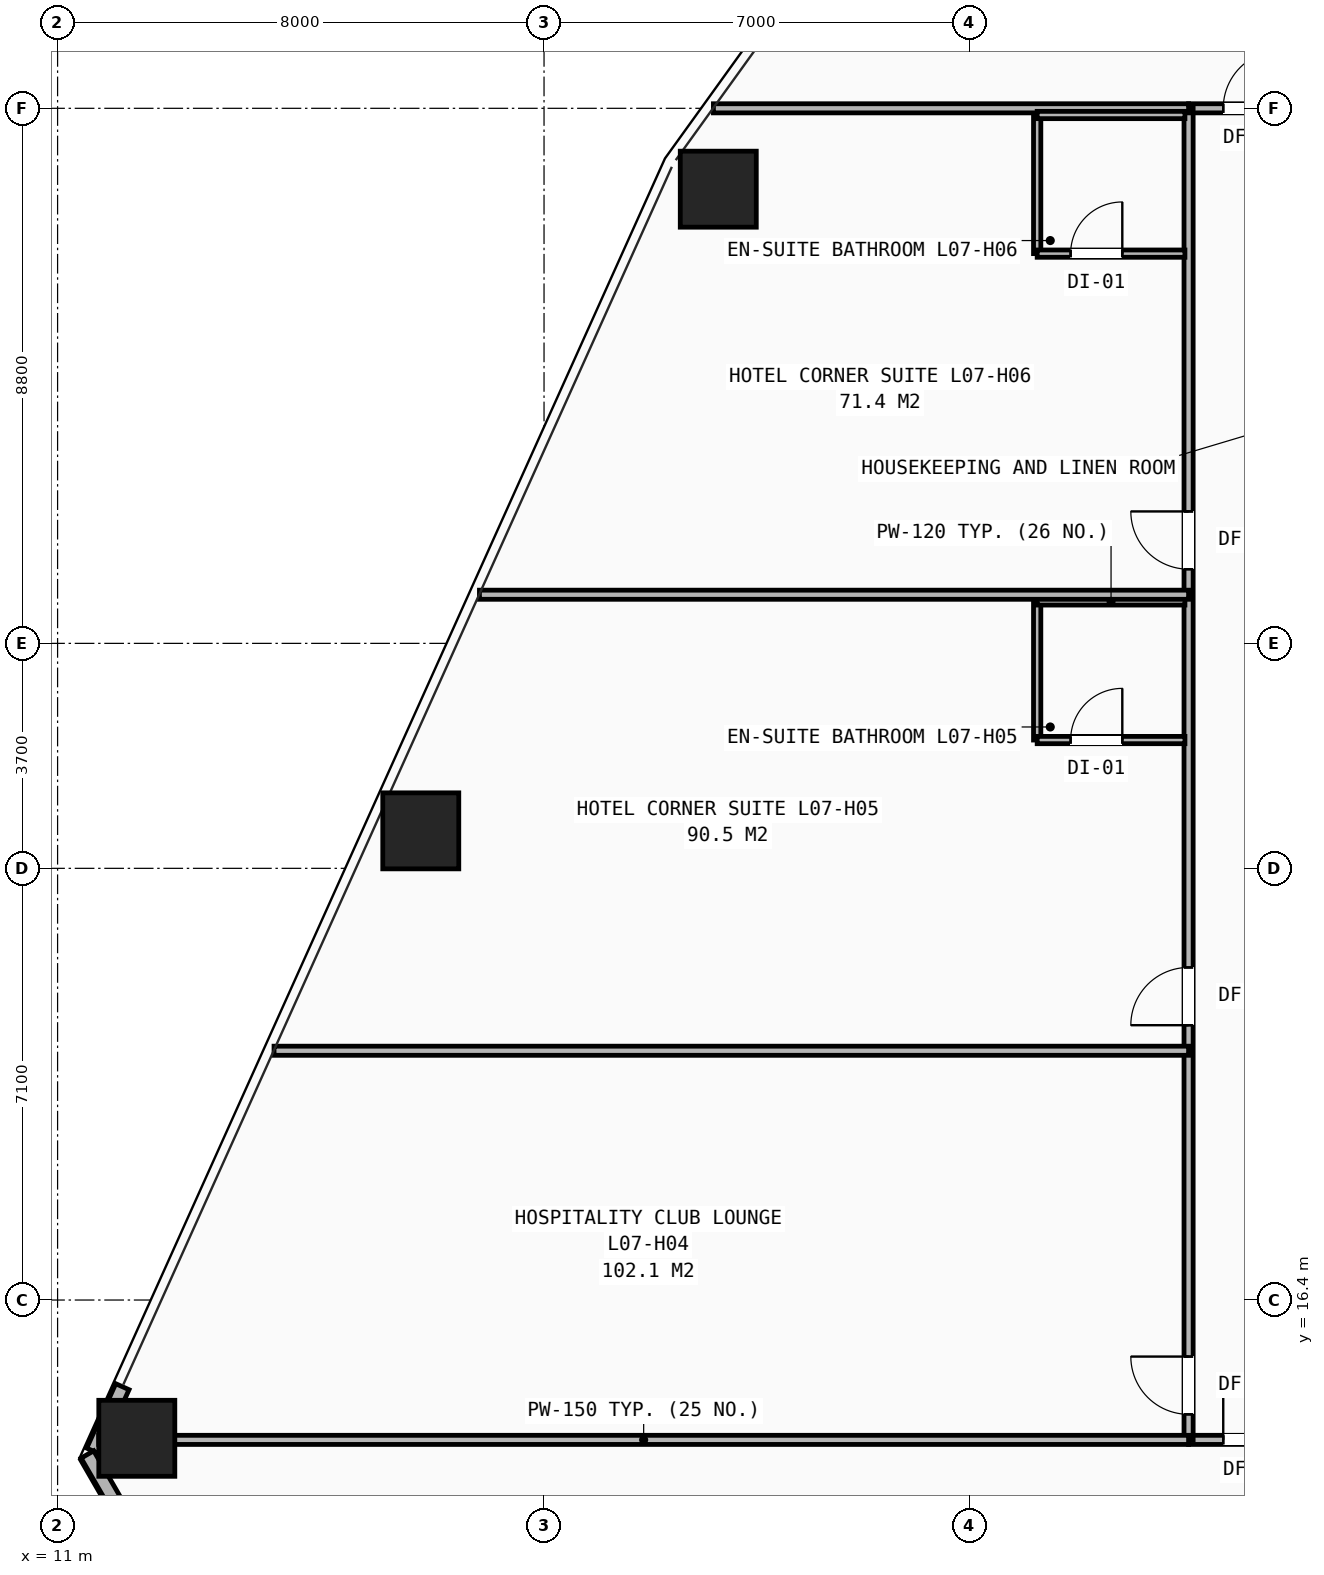
"""IFC4 building model, lengths in metres.
Left out: names, types, materials, properties, quantities, classifications, styles, units other than length and angle.
Written with IfcOpenShell. Run it as: python <this file> out.ifc"""

import sys

from ifc_helpers import new_model, si_unit, direction, frame, frame_2d, origin, origin_2d, place, context, subcontext, project, spatial, rectangle, hollow_rectangle, extrude, element, fill, save


model = new_model("IFC4")
c1 = context("Model", 3, precision=1e-05, world=origin(), true_north=direction((0.0, 1.0)))
c2 = subcontext(c1, "Body", "Model", "MODEL_VIEW")
j1 = project(units=[si_unit("LENGTHUNIT", "METRE"), si_unit("PLANEANGLEUNIT", "RADIAN")], contexts=[c1])
p1 = place(None, origin())
s1 = spatial("IfcSite", under=j1, at=p1, CompositionType="ELEMENT")
p2 = place(p1, origin())
s2 = spatial("IfcBuilding", under=s1, at=p2, CompositionType="ELEMENT")
p3 = place(p2, frame((0.0, 0.0, 30.4)))
s3 = spatial("IfcBuildingStorey", under=s2, at=p3, CompositionType="ELEMENT", Elevation=30.4)
for number, where, z_axis, x_axis in (
    (1, (21.865, 34.67, 0.0), (0.0, 0.0, 1.0), (1.0, 0.0, 0.0)),
    (2, (16.973, 24.116, 0.0), (0.0, 0.0, 1.0), (1.0, 0.0, 0.0)),
    (3, (12.303, 14.126, 0.0), (0.0, 0.0, 1.0), (1.0, 0.0, 0.0)),
):
    element("IfcColumn", number, at=place(p3, frame(where, z_axis=z_axis, x_axis=x_axis)), inside=s3, PredefinedType="COLUMN", context=c2, shape_type="SweptSolid", body=[
        extrude(hollow_rectangle(XDim=1.25, YDim=1.25, WallThickness=0.08, at=origin_2d()), origin(), (0.0, 0.0, 1.0), 3.2),
    ])
p4 = place(p3, frame((12.065, 14.975, 0.0), z_axis=(0.0, 0.0, 1.0), x_axis=(-0.410810004845, -0.91172097701, 0.0)))
e4 = element("IfcWall", 4, at=p4, inside=s3, PredefinedType="SHEAR", context=c2, shape_type="SweptSolid", body=[
    extrude(rectangle(XDim=1.162, YDim=0.24, at=frame_2d((0.581, 0.0))), origin(), (0.0, 0.0, 1.0), 2.263),
])
p5 = place(p3, frame((16.79, 4.68, 0.0), z_axis=(0.0, 0.0, 1.0), x_axis=(-0.49998363312, 0.866034853001, 0.0)))
e5 = element("IfcWall", 5, at=p5, inside=s3, PredefinedType="SHEAR", context=c2, shape_type="SweptSolid", body=[
    extrude(rectangle(XDim=10.6, YDim=0.24, at=frame_2d((5.3, 0.0))), origin(), (0.0, 0.0, 1.0), 2.263),
])
p6 = place(p3, frame((29.6, 14.1, 0.0), z_axis=(0.0, 0.0, 1.0), x_axis=(1.0, 0.0, 0.0)))
e6 = element("IfcWall", 6, at=p6, inside=s3, PredefinedType="PARTITIONING", context=c2, shape_type="SweptSolid", body=[
    extrude(rectangle(XDim=20.8, YDim=0.15, at=frame_2d((10.4, 0.0))), origin(), (0.0, 0.0, 1.0), 2.431),
])
p7 = place(p6, frame((0.57, 0.0, 0.0)))
e7 = element("IfcOpeningElement", 7, at=p7, cuts=e6, PredefinedType="OPENING", context=c2, shape_type="SweptSolid", body=[
    extrude(rectangle(XDim=0.95, YDim=2.1, at=frame_2d((0.475, 1.05))), frame((0.0, 0.085, 0.0), z_axis=(0.0, -1.0, 0.0), x_axis=(1.0, 0.0, 0.0)), (0.0, 0.0, 1.0), 0.17),
])
p8 = place(p6, frame((5.32, 0.0, 0.0)))
e8 = element("IfcOpeningElement", 8, at=p8, cuts=e6, PredefinedType="OPENING", context=c2, shape_type="SweptSolid", body=[
    extrude(rectangle(XDim=0.95, YDim=2.1, at=frame_2d((0.475, 1.05))), frame((0.0, 0.085, 0.0), z_axis=(0.0, -1.0, 0.0), x_axis=(1.0, 0.0, 0.0)), (0.0, 0.0, 1.0), 0.17),
])
p9 = place(p6, frame((13.32, 0.0, 0.0)))
e9 = element("IfcOpeningElement", 9, at=p9, cuts=e6, PredefinedType="OPENING", context=c2, shape_type="SweptSolid", body=[
    extrude(rectangle(XDim=0.95, YDim=2.1, at=frame_2d((0.475, 1.05))), frame((0.0, 0.085, 0.0), z_axis=(0.0, -1.0, 0.0), x_axis=(1.0, 0.0, 0.0)), (0.0, 0.0, 1.0), 0.17),
])
p10 = place(p3, frame((29.6, 36.0, 0.0), z_axis=(0.0, 0.0, 1.0), x_axis=(1.0, 0.0, 0.0)))
e10 = element("IfcWall", 10, at=p10, inside=s3, PredefinedType="PARTITIONING", context=c2, shape_type="SweptSolid", body=[
    extrude(rectangle(XDim=10.375, YDim=0.15, at=frame_2d((5.188, 0.0))), origin(), (0.0, 0.0, 1.0), 2.98),
])
p11 = place(p10, frame((0.57, 0.0, 0.0)))
e11 = element("IfcOpeningElement", 11, at=p11, cuts=e10, PredefinedType="OPENING", context=c2, shape_type="SweptSolid", body=[
    extrude(rectangle(XDim=0.95, YDim=2.1, at=frame_2d((0.475, 1.05))), frame((0.0, 0.085, 0.0), z_axis=(0.0, -1.0, 0.0), x_axis=(1.0, 0.0, 0.0)), (0.0, 0.0, 1.0), 0.17),
])
p12 = place(p10, frame((5.32, 0.0, 0.0)))
e12 = element("IfcOpeningElement", 12, at=p12, cuts=e10, PredefinedType="OPENING", context=c2, shape_type="SweptSolid", body=[
    extrude(rectangle(XDim=0.95, YDim=2.1, at=frame_2d((0.475, 1.05))), frame((0.0, 0.085, 0.0), z_axis=(0.0, -1.0, 0.0), x_axis=(1.0, 0.0, 0.0)), (0.0, 0.0, 1.0), 0.17),
])
p13 = place(p3, frame((29.6, 14.1, 0.0), z_axis=(0.0, 0.0, 1.0), x_axis=(0.0, 1.0, 0.0)))
e13 = element("IfcWall", 13, at=p13, inside=s3, PredefinedType="PARTITIONING", context=c2, shape_type="SweptSolid", body=[
    extrude(rectangle(XDim=21.9, YDim=0.15, at=frame_2d((10.95, 0.0))), origin(), (0.0, 0.0, 1.0), 2.431),
])
p14 = place(p13, frame((0.42, 0.0, 0.0)))
e14 = element("IfcOpeningElement", 14, at=p14, cuts=e13, PredefinedType="OPENING", context=c2, shape_type="SweptSolid", body=[
    extrude(rectangle(XDim=0.95, YDim=2.1, at=frame_2d((0.475, 1.05))), frame((0.0, 0.085, 0.0), z_axis=(0.0, -1.0, 0.0), x_axis=(1.0, 0.0, 0.0)), (0.0, 0.0, 1.0), 0.17),
])
p15 = place(p13, frame((6.82, 0.0, 0.0)))
e15 = element("IfcOpeningElement", 15, at=p15, cuts=e13, PredefinedType="OPENING", context=c2, shape_type="SweptSolid", body=[
    extrude(rectangle(XDim=0.95, YDim=2.1, at=frame_2d((0.475, 1.05))), frame((0.0, 0.085, 0.0), z_axis=(0.0, -1.0, 0.0), x_axis=(1.0, 0.0, 0.0)), (0.0, 0.0, 1.0), 0.17),
])
p16 = place(p13, frame((14.32, 0.0, 0.0)))
e16 = element("IfcOpeningElement", 16, at=p16, cuts=e13, PredefinedType="OPENING", context=c2, shape_type="SweptSolid", body=[
    extrude(rectangle(XDim=0.95, YDim=2.1, at=frame_2d((0.475, 1.05))), frame((0.0, 0.085, 0.0), z_axis=(0.0, -1.0, 0.0), x_axis=(1.0, 0.0, 0.0)), (0.0, 0.0, 1.0), 0.17),
])
p17 = place(p3, frame((11.677, 14.1, 0.0), z_axis=(0.0, 0.0, 1.0), x_axis=(1.0, 0.0, 0.0)))
e17 = element("IfcWall", 17, at=p17, inside=s3, PredefinedType="PARTITIONING", context=c2, shape_type="SweptSolid", body=[
    extrude(rectangle(XDim=17.923, YDim=0.15, at=frame_2d((8.961, 0.0))), origin(), (0.0, 0.0, 1.0), 2.268),
])
p18 = place(p3, frame((21.786, 36.0, 0.0), z_axis=(0.0, 0.0, 1.0), x_axis=(1.0, 0.0, 0.0)))
e18 = element("IfcWall", 18, at=p18, inside=s3, PredefinedType="PARTITIONING", context=c2, shape_type="SweptSolid", body=[
    extrude(rectangle(XDim=7.814, YDim=0.15, at=frame_2d((3.907, 0.0))), origin(), (0.0, 0.0, 1.0), 2.268),
])
p19 = place(p3, frame((14.56, 20.5, 0.0), z_axis=(0.0, 0.0, 1.0), x_axis=(1.0, 0.0, 0.0)))
e19 = element("IfcWall", 19, at=p19, inside=s3, PredefinedType="PARTITIONING", context=c2, shape_type="SweptSolid", body=[
    extrude(rectangle(XDim=15.041, YDim=0.15, at=frame_2d((7.52, 0.0))), origin(), (0.0, 0.0, 1.0), 2.268),
])
p20 = place(p3, frame((27.11, 25.61, 0.0), z_axis=(0.0, 0.0, 1.0), x_axis=(0.0, 1.0, 0.0)))
e20 = element("IfcWall", 20, at=p20, inside=s3, PredefinedType="PARTITIONING", context=c2, shape_type="SweptSolid", body=[
    extrude(rectangle(XDim=2.28, YDim=0.12, at=frame_2d((1.14, 0.0))), origin(), (0.0, 0.0, 1.0), 2.98),
])
p21 = place(p3, frame((27.11, 25.61, 0.0), z_axis=(0.0, 0.0, 1.0), x_axis=(1.0, 0.0, 0.0)))
e21 = element("IfcWall", 21, at=p21, inside=s3, PredefinedType="PARTITIONING", context=c2, shape_type="SweptSolid", body=[
    extrude(rectangle(XDim=2.43, YDim=0.12, at=frame_2d((1.215, 0.0))), origin(), (0.0, 0.0, 1.0), 2.98),
])
p22 = place(p21, frame((0.55, 0.0, 0.0)))
e22 = element("IfcOpeningElement", 22, at=p22, cuts=e21, PredefinedType="OPENING", context=c2, shape_type="SweptSolid", body=[
    extrude(rectangle(XDim=0.85, YDim=2.05, at=frame_2d((0.425, 1.025))), frame((0.0, 0.07, 0.0), z_axis=(0.0, -1.0, 0.0), x_axis=(1.0, 0.0, 0.0)), (0.0, 0.0, 1.0), 0.14),
])
p23 = place(p3, frame((27.11, 27.89, 0.0), z_axis=(0.0, 0.0, 1.0), x_axis=(1.0, 0.0, 0.0)))
e23 = element("IfcWall", 23, at=p23, inside=s3, PredefinedType="PARTITIONING", context=c2, shape_type="SweptSolid", body=[
    extrude(rectangle(XDim=2.43, YDim=0.12, at=frame_2d((1.215, 0.0))), origin(), (0.0, 0.0, 1.0), 2.98),
])
p24 = place(p3, frame((17.938, 28.0, 0.0), z_axis=(0.0, 0.0, 1.0), x_axis=(1.0, 0.0, 0.0)))
e24 = element("IfcWall", 24, at=p24, inside=s3, PredefinedType="PARTITIONING", context=c2, shape_type="SweptSolid", body=[
    extrude(rectangle(XDim=11.662, YDim=0.15, at=frame_2d((5.831, 0.0))), origin(), (0.0, 0.0, 1.0), 2.268),
])
p25 = place(p3, frame((27.11, 33.61, 0.0), z_axis=(0.0, 0.0, 1.0), x_axis=(0.0, 1.0, 0.0)))
e25 = element("IfcWall", 25, at=p25, inside=s3, PredefinedType="PARTITIONING", context=c2, shape_type="SweptSolid", body=[
    extrude(rectangle(XDim=2.28, YDim=0.12, at=frame_2d((1.14, 0.0))), origin(), (0.0, 0.0, 1.0), 2.513),
])
p26 = place(p3, frame((27.11, 33.61, 0.0), z_axis=(0.0, 0.0, 1.0), x_axis=(1.0, 0.0, 0.0)))
e26 = element("IfcWall", 26, at=p26, inside=s3, PredefinedType="PARTITIONING", context=c2, shape_type="SweptSolid", body=[
    extrude(rectangle(XDim=2.43, YDim=0.12, at=frame_2d((1.215, 0.0))), origin(), (0.0, 0.0, 1.0), 2.98),
])
p27 = place(p26, frame((0.55, 0.0, 0.0)))
e27 = element("IfcOpeningElement", 27, at=p27, cuts=e26, PredefinedType="OPENING", context=c2, shape_type="SweptSolid", body=[
    extrude(rectangle(XDim=0.85, YDim=2.05, at=frame_2d((0.425, 1.025))), frame((0.0, 0.07, 0.0), z_axis=(0.0, -1.0, 0.0), x_axis=(1.0, 0.0, 0.0)), (0.0, 0.0, 1.0), 0.14),
])
p28 = place(p3, frame((27.11, 35.89, 0.0), z_axis=(0.0, 0.0, 1.0), x_axis=(1.0, 0.0, 0.0)))
e28 = element("IfcWall", 28, at=p28, inside=s3, PredefinedType="PARTITIONING", context=c2, shape_type="SweptSolid", body=[
    extrude(rectangle(XDim=2.43, YDim=0.12, at=frame_2d((1.215, 0.0))), origin(), (0.0, 0.0, 1.0), 2.513),
])
p29 = place(p7, origin())
e29 = element("IfcDoor", 29, at=p29, inside=s3, OperationType="SINGLE_SWING_LEFT", PredefinedType="DOOR", context=c2, shape_type="SweptSolid", body=[
    extrude(rectangle(XDim=0.95, YDim=2.1, at=frame_2d((0.475, 1.05))), frame((0.0, 0.025, 0.0), z_axis=(0.0, -1.0, 0.0), x_axis=(1.0, 0.0, 0.0)), (0.0, 0.0, 1.0), 0.05),
])
fill(e7, e29)
p30 = place(p14, origin())
e30 = element("IfcDoor", 30, at=p30, inside=s3, OperationType="SINGLE_SWING_RIGHT", PredefinedType="DOOR", context=c2, shape_type="SweptSolid", body=[
    extrude(rectangle(XDim=0.95, YDim=2.1, at=frame_2d((0.475, 1.05))), frame((0.0, 0.025, 0.0), z_axis=(0.0, -1.0, 0.0), x_axis=(1.0, 0.0, 0.0)), (0.0, 0.0, 1.0), 0.05),
])
fill(e14, e30)
p31 = place(p15, origin())
e31 = element("IfcDoor", 31, at=p31, inside=s3, OperationType="SINGLE_SWING_LEFT", PredefinedType="DOOR", context=c2, shape_type="SweptSolid", body=[
    extrude(rectangle(XDim=0.95, YDim=2.1, at=frame_2d((0.475, 1.05))), frame((0.0, 0.025, 0.0), z_axis=(0.0, -1.0, 0.0), x_axis=(1.0, 0.0, 0.0)), (0.0, 0.0, 1.0), 0.05),
])
fill(e15, e31)
p32 = place(p22, origin())
e32 = element("IfcDoor", 32, at=p32, inside=s3, OperationType="SINGLE_SWING_RIGHT", PredefinedType="DOOR", context=c2, shape_type="SweptSolid", body=[
    extrude(rectangle(XDim=0.85, YDim=2.05, at=frame_2d((0.425, 1.025))), frame((0.0, 0.025, 0.0), z_axis=(0.0, -1.0, 0.0), x_axis=(1.0, 0.0, 0.0)), (0.0, 0.0, 1.0), 0.05),
])
fill(e22, e32)
p33 = place(p16, origin())
e33 = element("IfcDoor", 33, at=p33, inside=s3, OperationType="SINGLE_SWING_RIGHT", PredefinedType="DOOR", context=c2, shape_type="SweptSolid", body=[
    extrude(rectangle(XDim=0.95, YDim=2.1, at=frame_2d((0.475, 1.05))), frame((0.0, 0.025, 0.0), z_axis=(0.0, -1.0, 0.0), x_axis=(1.0, 0.0, 0.0)), (0.0, 0.0, 1.0), 0.05),
])
fill(e16, e33)
p34 = place(p27, origin())
e34 = element("IfcDoor", 34, at=p34, inside=s3, OperationType="SINGLE_SWING_RIGHT", PredefinedType="DOOR", context=c2, shape_type="SweptSolid", body=[
    extrude(rectangle(XDim=0.85, YDim=2.05, at=frame_2d((0.425, 1.025))), frame((0.0, 0.025, 0.0), z_axis=(0.0, -1.0, 0.0), x_axis=(1.0, 0.0, 0.0)), (0.0, 0.0, 1.0), 0.05),
])
fill(e27, e34)
p35 = place(p11, origin())
e35 = element("IfcDoor", 35, at=p35, inside=s3, OperationType="SINGLE_SWING_RIGHT", PredefinedType="DOOR", context=c2, shape_type="SweptSolid", body=[
    extrude(rectangle(XDim=0.95, YDim=2.1, at=frame_2d((0.475, 1.05))), frame((0.0, 0.025, 0.0), z_axis=(0.0, -1.0, 0.0), x_axis=(1.0, 0.0, 0.0)), (0.0, 0.0, 1.0), 0.05),
])
fill(e11, e35)
save(model, sys.argv[1])
